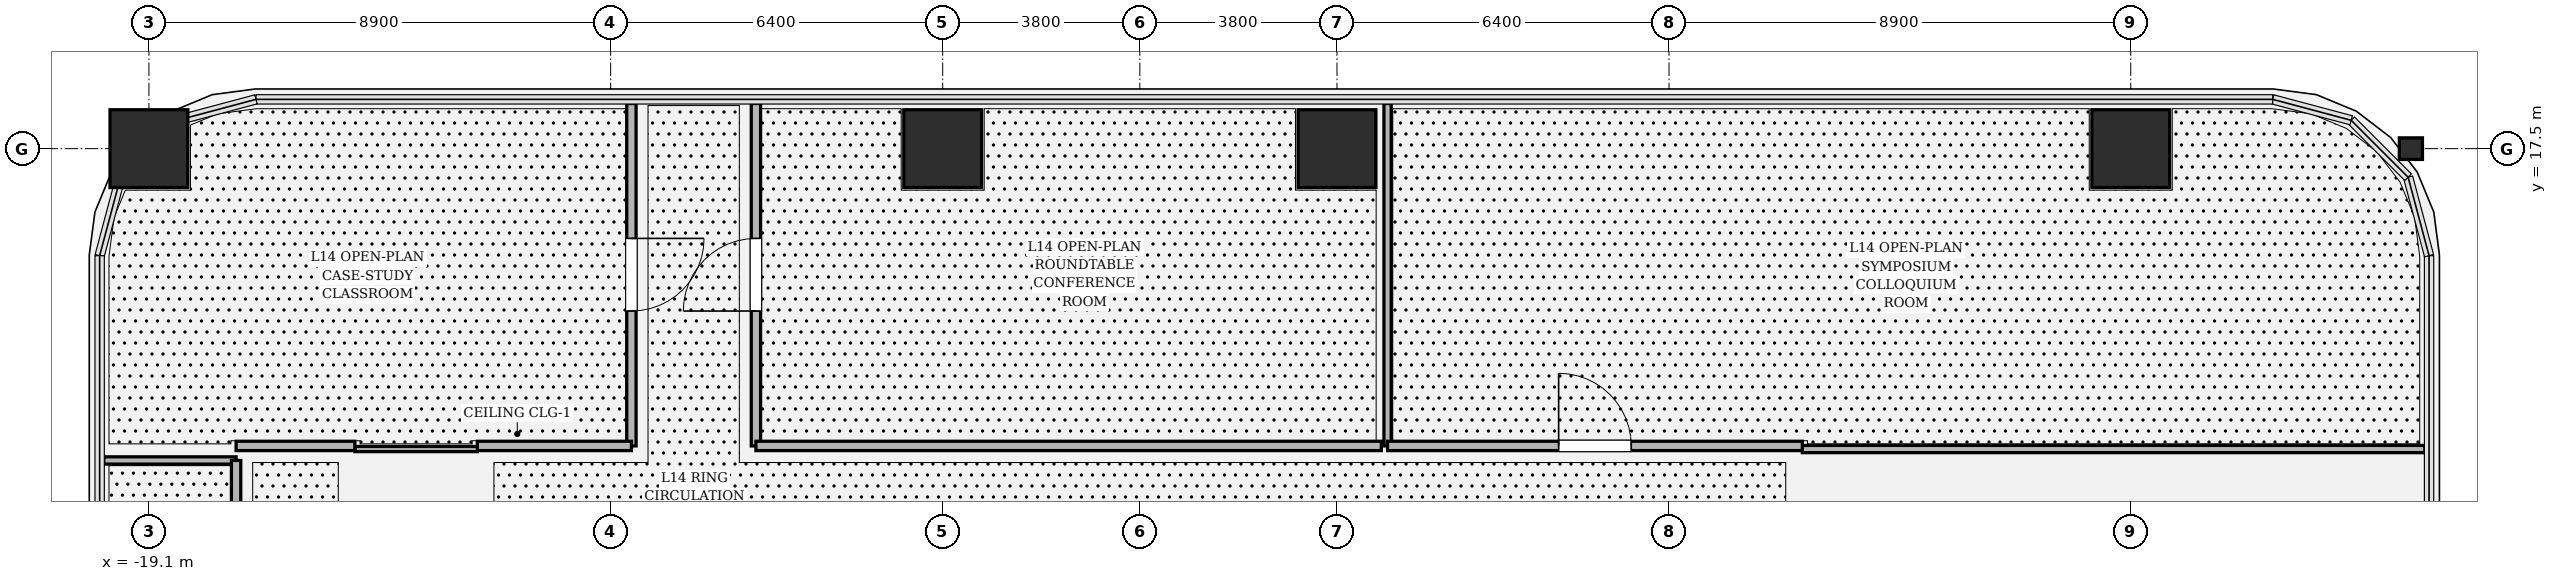
"""IFC4 building model, lengths in metres.
Left out: names, types, materials, properties, quantities, classifications, styles, units other than length and angle.
Written with IfcOpenShell. Run it as: python <this file> out.ifc"""

import sys

from ifc_helpers import new_model, si_unit, direction, frame, frame_2d, origin, origin_2d, place, context, subcontext, project, spatial, rectangle, hollow_rectangle, i_section, extrude, element, fill, save


model = new_model("IFC4")
c1 = context("Model", 3, precision=1e-05, world=origin(), true_north=direction((0.0, 1.0)))
c2 = subcontext(c1, "Body", "Model", "MODEL_VIEW")
j1 = project(units=[si_unit("LENGTHUNIT", "METRE"), si_unit("PLANEANGLEUNIT", "RADIAN")], contexts=[c1])
p1 = place(None, origin())
s1 = spatial("IfcSite", under=j1, at=p1, CompositionType="ELEMENT")
p2 = place(p1, origin())
s2 = spatial("IfcBuilding", under=s1, at=p2, CompositionType="ELEMENT")
p3 = place(p2, frame((0.0, 0.0, 64.65)))
s3 = spatial("IfcBuildingStorey", under=s2, at=p3, CompositionType="ELEMENT", Elevation=64.65)
for number, where, z_axis, x_axis in (
    (1, (19.1, 17.5, 0.0), (0.0, 0.0, 1.0), (1.0, 0.0, 0.0)),
    (2, (3.8, 17.5, 0.0), (0.0, 0.0, 1.0), (1.0, 0.0, 0.0)),
    (3, (-3.8, 17.5, 0.0), (0.0, 0.0, 1.0), (1.0, 0.0, 0.0)),
    (4, (-19.1, 17.5, 0.0), (0.0, 0.0, 1.0), (1.0, 0.0, 0.0)),
):
    element("IfcColumn", number, at=place(p3, frame(where, z_axis=z_axis, x_axis=x_axis)), inside=s3, PredefinedType="COLUMN", context=c2, shape_type="SweptSolid", body=[
        extrude(hollow_rectangle(XDim=1.5, YDim=1.5, WallThickness=0.045, at=origin_2d()), origin(), (0.0, 0.0, 1.0), 4.05),
    ])
p4 = place(p3, frame((24.5, 17.5, 0.0), z_axis=(0.0, 0.0, 1.0), x_axis=(0.0, 1.0, 0.0)))
e5 = element("IfcColumn", 5, at=p4, inside=s3, PredefinedType="COLUMN", context=c2, shape_type="SweptSolid", body=[
    extrude(i_section(OverallWidth=0.416, OverallDepth=0.446, WebThickness=0.039, FlangeThickness=0.062, FilletRadius=0.018, at=origin_2d()), origin(), (0.0, 0.0, 1.0), 4.048),
])
p5 = place(p3, frame((-19.97, 11.49, 0.0), z_axis=(0.0, 0.0, 1.0), x_axis=(1.0, 0.0, 0.0)))
e6 = element("IfcWall", 6, at=p5, inside=s3, PredefinedType="PARTITIONING", context=c2, shape_type="SweptSolid", body=[
    extrude(rectangle(XDim=2.55, YDim=0.14, at=frame_2d((1.275, 0.0))), origin(), (0.0, 0.0, 1.0), 3.104),
])
p6 = place(p3, frame((-17.42, 11.49, 0.0), z_axis=(0.0, 0.0, 1.0), x_axis=(0.0, -1.0, 0.0)))
e7 = element("IfcWall", 7, at=p6, inside=s3, PredefinedType="PARTITIONING", context=c2, shape_type="SweptSolid", body=[
    extrude(rectangle(XDim=13.78, YDim=0.18, at=frame_2d((6.89, 0.0))), origin(), (0.0, 0.0, 1.0), 3.104),
])
p7 = place(p6, frame((5.915, 0.0, 0.0)))
e8 = element("IfcOpeningElement", 8, at=p7, cuts=e7, PredefinedType="OPENING", context=c2, shape_type="SweptSolid", body=[
    extrude(rectangle(XDim=1.05, YDim=2.2, at=frame_2d((0.525, 1.1))), frame((0.0, 0.1, 0.0), z_axis=(0.0, -1.0, 0.0), x_axis=(1.0, 0.0, 0.0)), (0.0, 0.0, 1.0), 0.2),
])
p8 = place(p3, frame((-9.8, 18.37, 0.0), z_axis=(0.0, 0.0, 1.0), x_axis=(0.0, -1.0, 0.0)))
e9 = element("IfcWall", 9, at=p8, inside=s3, PredefinedType="PARTITIONING", context=c2, shape_type="SweptSolid", body=[
    extrude(rectangle(XDim=6.6, YDim=0.18, at=frame_2d((3.3, 0.0))), origin(), (0.0, 0.0, 1.0), 3.104),
])
p9 = place(p8, frame((2.6, 0.0, 0.0)))
e10 = element("IfcOpeningElement", 10, at=p9, cuts=e9, PredefinedType="OPENING", context=c2, shape_type="SweptSolid", body=[
    extrude(rectangle(XDim=1.4, YDim=2.25, at=frame_2d((0.7, 1.125))), frame((0.0, 0.1, 0.0), z_axis=(0.0, -1.0, 0.0), x_axis=(1.0, 0.0, 0.0)), (0.0, 0.0, 1.0), 0.2),
])
p10 = place(p3, frame((-9.8, 11.77, 0.0), z_axis=(0.0, 0.0, 1.0), x_axis=(-1.0, 0.0, 0.0)))
e11 = element("IfcWall", 11, at=p10, inside=s3, PredefinedType="PARTITIONING", context=c2, shape_type="SweptSolid", body=[
    extrude(rectangle(XDim=2.97, YDim=0.18, at=frame_2d((1.485, 0.0))), origin(), (0.0, 0.0, 1.0), 3.104),
])
p11 = place(p3, frame((-12.77, 11.71, 0.0), z_axis=(0.0, 0.0, 1.0), x_axis=(-1.0, 0.0, 0.0)))
e12 = element("IfcWall", 12, at=p11, inside=s3, PredefinedType="PARTITIONING", context=c2, shape_type="SweptSolid", body=[
    extrude(rectangle(XDim=2.36, YDim=0.1, at=frame_2d((1.18, 0.0))), origin(), (0.0, 0.0, 1.0), 3.354),
])
p12 = place(p3, frame((-15.13, 11.77, 0.0), z_axis=(0.0, 0.0, 1.0), x_axis=(-1.0, 0.0, 0.0)))
e13 = element("IfcWall", 13, at=p12, inside=s3, PredefinedType="PARTITIONING", context=c2, shape_type="SweptSolid", body=[
    extrude(rectangle(XDim=2.29, YDim=0.18, at=frame_2d((1.145, 0.0))), origin(), (0.0, 0.0, 1.0), 3.81),
])
p13 = place(p3, frame((4.775, 11.77, 0.0), z_axis=(0.0, 0.0, 1.0), x_axis=(0.0, 1.0, 0.0)))
e14 = element("IfcWall", 14, at=p13, inside=s3, PredefinedType="PARTITIONING", context=c2, shape_type="SweptSolid", body=[
    extrude(rectangle(XDim=6.6, YDim=0.14, at=frame_2d((3.3, 0.0))), origin(), (0.0, 0.0, 1.0), 3.104),
])
p14 = place(p3, frame((24.77, 11.71, 0.0), z_axis=(0.0, 0.0, 1.0), x_axis=(-1.0, 0.0, 0.0)))
e15 = element("IfcWall", 15, at=p14, inside=s3, PredefinedType="PARTITIONING", context=c2, shape_type="SweptSolid", body=[
    extrude(rectangle(XDim=12.0, YDim=0.14, at=frame_2d((6.0, 0.0))), origin(), (0.0, 0.0, 1.0), 2.524),
])
p15 = place(p3, frame((12.77, 11.77, 0.0), z_axis=(0.0, 0.0, 1.0), x_axis=(-1.0, 0.0, 0.0)))
e16 = element("IfcWall", 16, at=p15, inside=s3, PredefinedType="PARTITIONING", context=c2, shape_type="SweptSolid", body=[
    extrude(rectangle(XDim=7.995, YDim=0.18, at=frame_2d((3.998, 0.0))), origin(), (0.0, 0.0, 1.0), 3.104),
])
p16 = place(p15, frame((3.298, 0.0, 0.0)))
e17 = element("IfcOpeningElement", 17, at=p16, cuts=e16, PredefinedType="OPENING", context=c2, shape_type="SweptSolid", body=[
    extrude(rectangle(XDim=1.4, YDim=2.25, at=frame_2d((0.7, 1.125))), frame((0.0, 0.1, 0.0), z_axis=(0.0, -1.0, 0.0), x_axis=(1.0, 0.0, 0.0)), (0.0, 0.0, 1.0), 0.2),
])
p17 = place(p3, frame((-7.4, 11.77, 0.0), z_axis=(0.0, 0.0, 1.0), x_axis=(0.0, 1.0, 0.0)))
e18 = element("IfcWall", 18, at=p17, inside=s3, PredefinedType="PARTITIONING", context=c2, shape_type="SweptSolid", body=[
    extrude(rectangle(XDim=6.6, YDim=0.18, at=frame_2d((3.3, 0.0))), origin(), (0.0, 0.0, 1.0), 3.104),
])
p18 = place(p17, frame((2.6, 0.0, 0.0)))
e19 = element("IfcOpeningElement", 19, at=p18, cuts=e18, PredefinedType="OPENING", context=c2, shape_type="SweptSolid", body=[
    extrude(rectangle(XDim=1.4, YDim=2.25, at=frame_2d((0.7, 1.125))), frame((0.0, 0.1, 0.0), z_axis=(0.0, -1.0, 0.0), x_axis=(1.0, 0.0, 0.0)), (0.0, 0.0, 1.0), 0.2),
])
p19 = place(p3, frame((4.655, 11.77, 0.0), z_axis=(0.0, 0.0, 1.0), x_axis=(-1.0, 0.0, 0.0)))
e20 = element("IfcWall", 20, at=p19, inside=s3, PredefinedType="PARTITIONING", context=c2, shape_type="SweptSolid", body=[
    extrude(rectangle(XDim=12.055, YDim=0.18, at=frame_2d((6.027, 0.0))), origin(), (0.0, 0.0, 1.0), 3.104),
])
p20 = place(p9, origin())
e21 = element("IfcDoor", 21, at=p20, inside=s3, OperationType="SINGLE_SWING_LEFT", PredefinedType="DOOR", context=c2, shape_type="SweptSolid", body=[
    extrude(rectangle(XDim=1.4, YDim=2.25, at=frame_2d((0.7, 1.125))), frame((0.0, 0.025, 0.0), z_axis=(0.0, -1.0, 0.0), x_axis=(1.0, 0.0, 0.0)), (0.0, 0.0, 1.0), 0.05),
])
fill(e10, e21)
p21 = place(p16, origin())
e22 = element("IfcDoor", 22, at=p21, inside=s3, OperationType="SINGLE_SWING_RIGHT", PredefinedType="DOOR", context=c2, shape_type="SweptSolid", body=[
    extrude(rectangle(XDim=1.4, YDim=2.25, at=frame_2d((0.7, 1.125))), frame((0.0, 0.025, 0.0), z_axis=(0.0, -1.0, 0.0), x_axis=(1.0, 0.0, 0.0)), (0.0, 0.0, 1.0), 0.05),
])
fill(e17, e22)
p22 = place(p18, origin())
e23 = element("IfcDoor", 23, at=p22, inside=s3, OperationType="SINGLE_SWING_LEFT", PredefinedType="DOOR", context=c2, shape_type="SweptSolid", body=[
    extrude(rectangle(XDim=1.4, YDim=2.25, at=frame_2d((0.7, 1.125))), frame((0.0, 0.025, 0.0), z_axis=(0.0, -1.0, 0.0), x_axis=(1.0, 0.0, 0.0)), (0.0, 0.0, 1.0), 0.05),
])
fill(e19, e23)
save(model, sys.argv[1])
